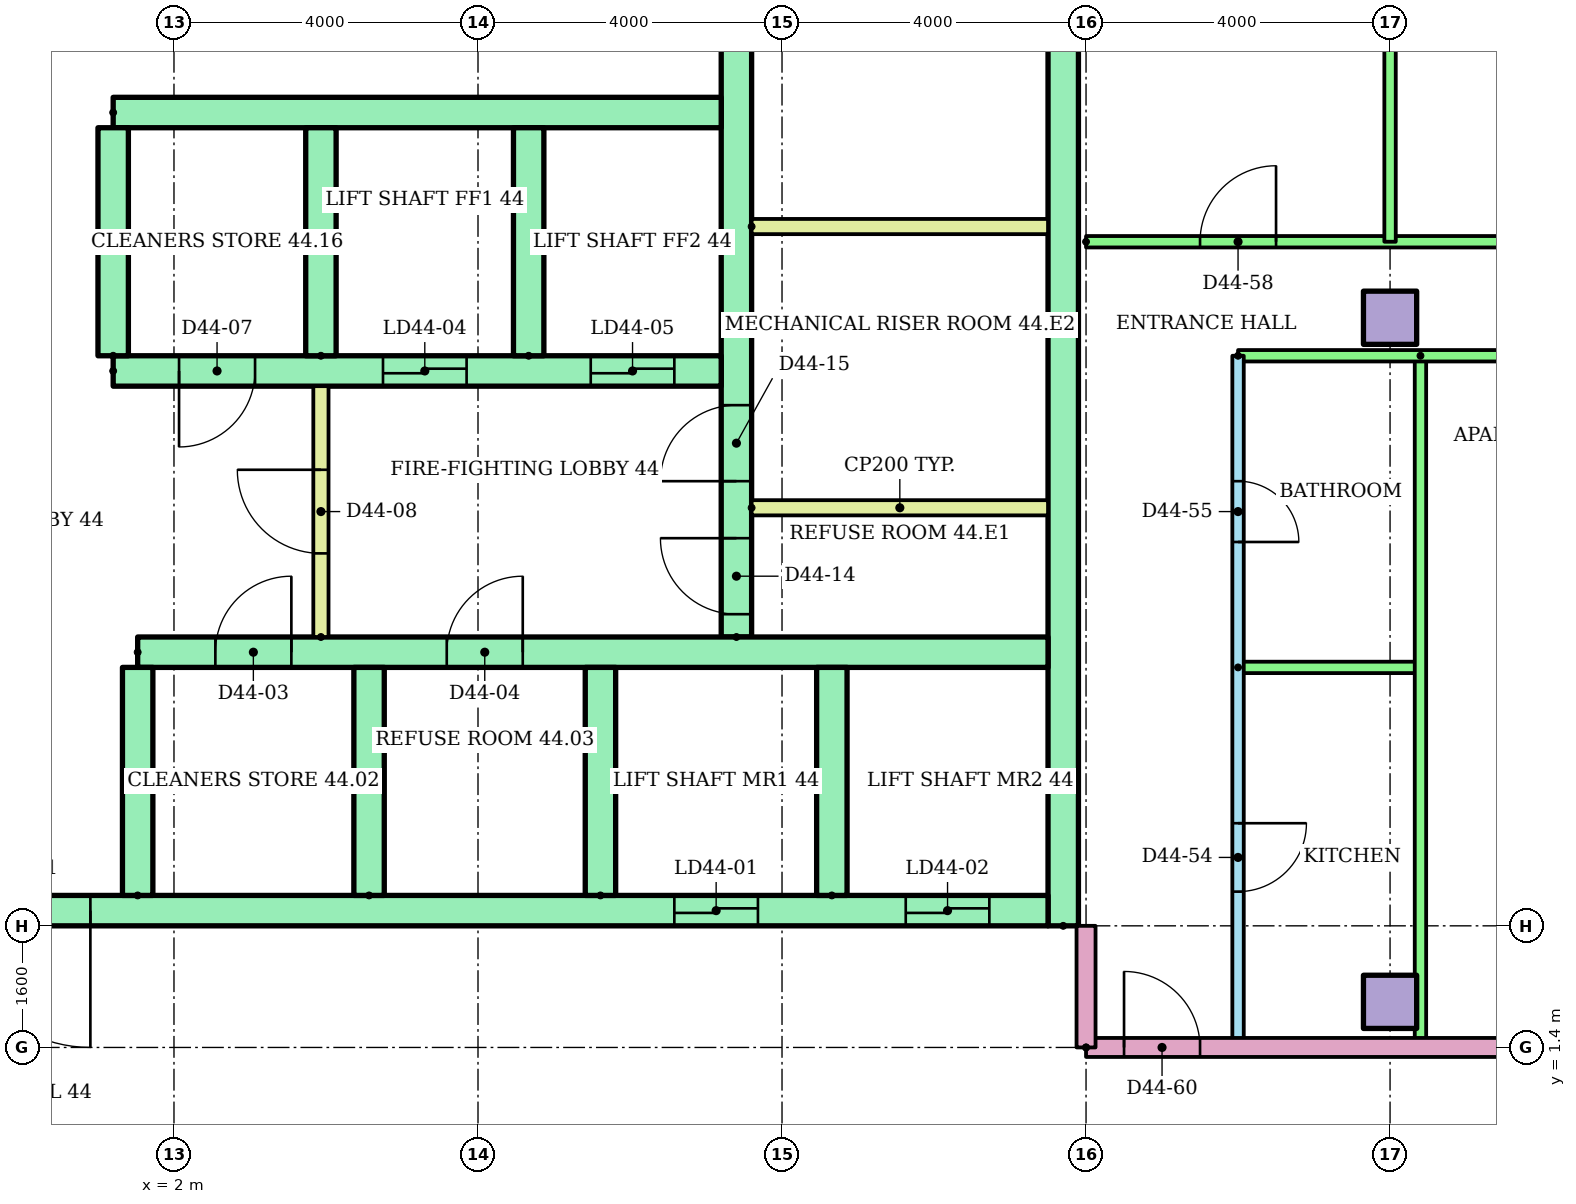
"""IFC4 building model, lengths in metres.
Left out: names, types, materials, properties, quantities, classifications, styles, units other than length and angle.
Written with IfcOpenShell. Run it as: python <this file> out.ifc"""

import sys

from ifc_helpers import new_model, si_unit, direction, frame, frame_2d, origin, origin_2d, place, context, subcontext, project, spatial, rectangle, extrude, element, fill, save


model = new_model("IFC4")
c1 = context("Model", 3, precision=1e-05, world=origin(), true_north=direction((0.0, 1.0)))
c2 = subcontext(c1, "Body", "Model", "MODEL_VIEW")
j1 = project(units=[si_unit("LENGTHUNIT", "METRE"), si_unit("PLANEANGLEUNIT", "RADIAN")], contexts=[c1])
p1 = place(None, origin())
s1 = spatial("IfcSite", under=j1, at=p1, CompositionType="ELEMENT")
p2 = place(p1, origin())
s2 = spatial("IfcBuilding", under=s1, at=p2, CompositionType="ELEMENT")
p3 = place(p2, frame((0.0, 0.0, 171.7)))
s3 = spatial("IfcBuildingStorey", under=s2, at=p3, CompositionType="ELEMENT", Elevation=171.7)
for number, where in (
    (1, (18.0, 2.0, 0.0)),
    (2, (18.0, 11.0, 0.0)),
):
    element("IfcColumn", number, at=place(p3, frame(where)), inside=s3, PredefinedType="COLUMN", context=c2, shape_type="SweptSolid", body=[
        extrude(rectangle(XDim=0.7, YDim=0.7, at=origin_2d()), origin(), (0.0, 0.0, 1.0), 3.2),
    ])
p4 = place(p3, frame((13.7, 3.0, 0.0), z_axis=(0.0, 0.0, 1.0), x_axis=(0.0, 1.0, 0.0)))
e3 = element("IfcWall", 3, at=p4, inside=s3, PredefinedType="SHEAR", context=c2, shape_type="SweptSolid", body=[
    extrude(rectangle(XDim=17.0, YDim=0.4, at=frame_2d((8.5, 0.0))), origin(), (0.0, 0.0, 1.0), 2.92),
])
p5 = place(p3, frame((9.4, 6.8, 0.0), z_axis=(0.0, 0.0, 1.0), x_axis=(0.0, 1.0, 0.0)))
e4 = element("IfcWall", 4, at=p5, inside=s3, PredefinedType="SHEAR", context=c2, shape_type="SweptSolid", body=[
    extrude(rectangle(XDim=12.7, YDim=0.4, at=frame_2d((6.35, 0.0))), origin(), (0.0, 0.0, 1.0), 2.92),
])
p6 = place(p5, frame((0.3, 0.0, 0.0)))
e5 = element("IfcOpeningElement", 5, at=p6, cuts=e4, PredefinedType="OPENING", context=c2, shape_type="SweptSolid", body=[
    extrude(rectangle(XDim=1.0, YDim=2.1, at=frame_2d((0.5, 1.05))), frame((0.0, 0.21, 0.0), z_axis=(0.0, -1.0, 0.0), x_axis=(1.0, 0.0, 0.0)), (0.0, 0.0, 1.0), 0.42),
])
p7 = place(p5, frame((2.05, 0.0, 0.0)))
e6 = element("IfcOpeningElement", 6, at=p7, cuts=e4, PredefinedType="OPENING", context=c2, shape_type="SweptSolid", body=[
    extrude(rectangle(XDim=1.0, YDim=2.1, at=frame_2d((0.5, 1.05))), frame((0.0, 0.21, 0.0), z_axis=(0.0, -1.0, 0.0), x_axis=(1.0, 0.0, 0.0)), (0.0, 0.0, 1.0), 0.42),
])
p8 = place(p5, frame((7.925, 0.0, 0.0)))
e7 = element("IfcOpeningElement", 7, at=p8, cuts=e4, PredefinedType="OPENING", context=c2, shape_type="SweptSolid", body=[
    extrude(rectangle(XDim=1.0, YDim=2.1, at=frame_2d((0.5, 1.05))), frame((0.0, 0.21, 0.0), z_axis=(0.0, -1.0, 0.0), x_axis=(1.0, 0.0, 0.0)), (0.0, 0.0, 1.0), 0.42),
])
p9 = place(p3, frame((-13.5, 3.2, 0.0)))
e8 = element("IfcWall", 8, at=p9, inside=s3, PredefinedType="SHEAR", context=c2, shape_type="SweptSolid", body=[
    extrude(rectangle(XDim=27.0, YDim=0.4, at=frame_2d((13.5, 0.0))), origin(), (0.0, 0.0, 1.0), 2.92),
])
p10 = place(p9, frame((22.083, 0.0, 0.0)))
e9 = element("IfcOpeningElement", 9, at=p10, cuts=e8, PredefinedType="OPENING", context=c2, shape_type="SweptSolid", body=[
    extrude(rectangle(XDim=1.1, YDim=2.1, at=frame_2d((0.55, 1.05))), frame((0.0, 0.21, 0.0), z_axis=(0.0, -1.0, 0.0), x_axis=(1.0, 0.0, 0.0)), (0.0, 0.0, 1.0), 0.42),
])
p11 = place(p9, frame((25.128, 0.0, 0.0)))
e10 = element("IfcOpeningElement", 10, at=p11, cuts=e8, PredefinedType="OPENING", context=c2, shape_type="SweptSolid", body=[
    extrude(rectangle(XDim=1.1, YDim=2.1, at=frame_2d((0.55, 1.05))), frame((0.0, 0.21, 0.0), z_axis=(0.0, -1.0, 0.0), x_axis=(1.0, 0.0, 0.0)), (0.0, 0.0, 1.0), 0.42),
])
p12 = place(p9, frame((12.6, 0.0, 0.0)))
e11 = element("IfcOpeningElement", 11, at=p12, cuts=e8, PredefinedType="OPENING", context=c2, shape_type="SweptSolid", body=[
    extrude(rectangle(XDim=1.8, YDim=2.1, at=frame_2d((0.9, 1.05))), frame((0.0, 0.21, 0.0), z_axis=(0.0, -1.0, 0.0), x_axis=(1.0, 0.0, 0.0)), (0.0, 0.0, 1.0), 0.42),
])
p13 = place(p3, frame((1.522, 6.6, 0.0)))
e12 = element("IfcWall", 12, at=p13, inside=s3, PredefinedType="SHEAR", context=c2, shape_type="SweptSolid", body=[
    extrude(rectangle(XDim=11.978, YDim=0.4, at=frame_2d((5.989, 0.0))), origin(), (0.0, 0.0, 1.0), 2.92),
])
p14 = place(p13, frame((1.022, 0.0, 0.0)))
e13 = element("IfcOpeningElement", 13, at=p14, cuts=e12, PredefinedType="OPENING", context=c2, shape_type="SweptSolid", body=[
    extrude(rectangle(XDim=1.0, YDim=2.1, at=frame_2d((0.5, 1.05))), frame((0.0, 0.21, 0.0), z_axis=(0.0, -1.0, 0.0), x_axis=(1.0, 0.0, 0.0)), (0.0, 0.0, 1.0), 0.42),
])
p15 = place(p13, frame((4.067, 0.0, 0.0)))
e14 = element("IfcOpeningElement", 14, at=p15, cuts=e12, PredefinedType="OPENING", context=c2, shape_type="SweptSolid", body=[
    extrude(rectangle(XDim=1.0, YDim=2.1, at=frame_2d((0.5, 1.05))), frame((0.0, 0.21, 0.0), z_axis=(0.0, -1.0, 0.0), x_axis=(1.0, 0.0, 0.0)), (0.0, 0.0, 1.0), 0.42),
])
for number, where, z_axis, x_axis in (
    (15, (1.522, 3.4, 0.0), (0.0, 0.0, 1.0), (0.0, 1.0, 0.0)),
    (16, (4.567, 3.4, 0.0), (0.0, 0.0, 1.0), (0.0, 1.0, 0.0)),
    (17, (7.611, 3.4, 0.0), (0.0, 0.0, 1.0), (0.0, 1.0, 0.0)),
    (18, (10.656, 3.4, 0.0), (0.0, 0.0, 1.0), (0.0, 1.0, 0.0)),
):
    element("IfcWall", number, at=place(p3, frame(where, z_axis=z_axis, x_axis=x_axis)), inside=s3, PredefinedType="SHEAR", context=c2, shape_type="SweptSolid", body=[
        extrude(rectangle(XDim=3.0, YDim=0.4, at=frame_2d((1.5, 0.0))), origin(), (0.0, 0.0, 1.0), 2.92),
    ])
p16 = place(p3, frame((1.2, 10.3, 0.0)))
e19 = element("IfcWall", 19, at=p16, inside=s3, PredefinedType="SHEAR", context=c2, shape_type="SweptSolid", body=[
    extrude(rectangle(XDim=8.0, YDim=0.4, at=frame_2d((4.0, 0.0))), origin(), (0.0, 0.0, 1.0), 2.92),
])
p17 = place(p16, frame((3.55, 0.0, 0.0)))
e20 = element("IfcOpeningElement", 20, at=p17, cuts=e19, PredefinedType="OPENING", context=c2, shape_type="SweptSolid", body=[
    extrude(rectangle(XDim=1.1, YDim=2.1, at=frame_2d((0.55, 1.05))), frame((0.0, 0.21, 0.0), z_axis=(0.0, -1.0, 0.0), x_axis=(1.0, 0.0, 0.0)), (0.0, 0.0, 1.0), 0.42),
])
p18 = place(p16, frame((6.283, 0.0, 0.0)))
e21 = element("IfcOpeningElement", 21, at=p18, cuts=e19, PredefinedType="OPENING", context=c2, shape_type="SweptSolid", body=[
    extrude(rectangle(XDim=1.1, YDim=2.1, at=frame_2d((0.55, 1.05))), frame((0.0, 0.21, 0.0), z_axis=(0.0, -1.0, 0.0), x_axis=(1.0, 0.0, 0.0)), (0.0, 0.0, 1.0), 0.42),
])
p19 = place(p16, frame((0.867, 0.0, 0.0)))
e22 = element("IfcOpeningElement", 22, at=p19, cuts=e19, PredefinedType="OPENING", context=c2, shape_type="SweptSolid", body=[
    extrude(rectangle(XDim=1.0, YDim=2.1, at=frame_2d((0.5, 1.05))), frame((0.0, 0.21, 0.0), z_axis=(0.0, -1.0, 0.0), x_axis=(1.0, 0.0, 0.0)), (0.0, 0.0, 1.0), 0.42),
])
p20 = place(p3, frame((1.2, 13.7, 0.0)))
e23 = element("IfcWall", 23, at=p20, inside=s3, PredefinedType="SHEAR", context=c2, shape_type="SweptSolid", body=[
    extrude(rectangle(XDim=8.0, YDim=0.4, at=frame_2d((4.0, 0.0))), origin(), (0.0, 0.0, 1.0), 2.92),
])
for number, where, z_axis, x_axis in (
    (24, (1.2, 10.5, 0.0), (0.0, 0.0, 1.0), (0.0, 1.0, 0.0)),
    (25, (3.933, 10.5, 0.0), (0.0, 0.0, 1.0), (0.0, 1.0, 0.0)),
    (26, (6.667, 10.5, 0.0), (0.0, 0.0, 1.0), (0.0, 1.0, 0.0)),
):
    element("IfcWall", number, at=place(p3, frame(where, z_axis=z_axis, x_axis=x_axis)), inside=s3, PredefinedType="SHEAR", context=c2, shape_type="SweptSolid", body=[
        extrude(rectangle(XDim=3.0, YDim=0.4, at=frame_2d((1.5, 0.0))), origin(), (0.0, 0.0, 1.0), 2.92),
    ])
p21 = place(p3, frame((3.933, 6.8, 0.0), z_axis=(0.0, 0.0, 1.0), x_axis=(0.0, 1.0, 0.0)))
e27 = element("IfcWall", 27, at=p21, inside=s3, PredefinedType="PARTITIONING", context=c2, shape_type="SweptSolid", body=[
    extrude(rectangle(XDim=3.3, YDim=0.2, at=frame_2d((1.65, 0.0))), origin(), (0.0, 0.0, 1.0), 2.92),
])
p22 = place(p21, frame((1.1, 0.0, 0.0)))
e28 = element("IfcOpeningElement", 28, at=p22, cuts=e27, PredefinedType="OPENING", context=c2, shape_type="SweptSolid", body=[
    extrude(rectangle(XDim=1.1, YDim=2.1, at=frame_2d((0.55, 1.05))), frame((0.0, 0.11, 0.0), z_axis=(0.0, -1.0, 0.0), x_axis=(1.0, 0.0, 0.0)), (0.0, 0.0, 1.0), 0.22),
])
for number, where in (
    (29, (9.6, 8.5, 0.0)),
    (30, (9.6, 12.2, 0.0)),
):
    element("IfcWall", number, at=place(p3, frame(where)), inside=s3, PredefinedType="PARTITIONING", context=c2, shape_type="SweptSolid", body=[
        extrude(rectangle(XDim=3.9, YDim=0.2, at=frame_2d((1.95, 0.0))), origin(), (0.0, 0.0, 1.0), 2.92),
    ])
p23 = place(p3, frame((16.0, 10.5, 0.0), z_axis=(0.0, 0.0, 1.0), x_axis=(0.0, -1.0, 0.0)))
e31 = element("IfcWall", 31, at=p23, inside=s3, PredefinedType="PARTITIONING", context=c2, shape_type="SweptSolid", body=[
    extrude(rectangle(XDim=9.1, YDim=0.15, at=frame_2d((4.55, 0.0))), origin(), (0.0, 0.0, 1.0), 2.4),
])
p24 = place(p23, frame((6.15, 0.0, 0.0)))
e32 = element("IfcOpeningElement", 32, at=p24, cuts=e31, PredefinedType="OPENING", context=c2, shape_type="SweptSolid", body=[
    extrude(rectangle(XDim=0.9, YDim=2.1, at=frame_2d((0.45, 1.05))), frame((0.0, 0.085, 0.0), z_axis=(0.0, -1.0, 0.0), x_axis=(1.0, 0.0, 0.0)), (0.0, 0.0, 1.0), 0.17),
])
p25 = place(p23, frame((1.65, 0.0, 0.0)))
e33 = element("IfcOpeningElement", 33, at=p25, cuts=e31, PredefinedType="OPENING", context=c2, shape_type="SweptSolid", body=[
    extrude(rectangle(XDim=0.8, YDim=2.1, at=frame_2d((0.4, 1.05))), frame((0.0, 0.085, 0.0), z_axis=(0.0, -1.0, 0.0), x_axis=(1.0, 0.0, 0.0)), (0.0, 0.0, 1.0), 0.17),
])
p26 = place(p3, frame((16.0, 6.4, 0.0)))
e34 = element("IfcWall", 34, at=p26, inside=s3, PredefinedType="PARTITIONING", context=c2, shape_type="SweptSolid", body=[
    extrude(rectangle(XDim=2.4, YDim=0.15, at=frame_2d((1.2, 0.0))), origin(), (0.0, 0.0, 1.0), 2.4),
])
p27 = place(p3, frame((18.4, 10.5, 0.0), z_axis=(0.0, 0.0, 1.0), x_axis=(0.0, -1.0, 0.0)))
e35 = element("IfcWall", 35, at=p27, inside=s3, PredefinedType="PARTITIONING", context=c2, shape_type="SweptSolid", body=[
    extrude(rectangle(XDim=9.1, YDim=0.15, at=frame_2d((4.55, 0.0))), origin(), (0.0, 0.0, 1.0), 2.4),
])
p28 = place(p3, frame((26.0, 10.5, 0.0), z_axis=(0.0, 0.0, 1.0), x_axis=(-1.0, 0.0, 0.0)))
e36 = element("IfcWall", 36, at=p28, inside=s3, PredefinedType="PARTITIONING", context=c2, shape_type="SweptSolid", body=[
    extrude(rectangle(XDim=10.0, YDim=0.15, at=frame_2d((5.0, 0.0))), origin(), (0.0, 0.0, 1.0), 2.4),
])
p29 = place(p28, frame((4.9, 0.0, 0.0)))
e37 = element("IfcOpeningElement", 37, at=p29, cuts=e36, PredefinedType="OPENING", context=c2, shape_type="SweptSolid", body=[
    extrude(rectangle(XDim=0.9, YDim=2.1, at=frame_2d((0.45, 1.05))), frame((0.0, 0.085, 0.0), z_axis=(0.0, -1.0, 0.0), x_axis=(1.0, 0.0, 0.0)), (0.0, 0.0, 1.0), 0.17),
])
p30 = place(p28, frame((1.1, 0.0, 0.0)))
e38 = element("IfcOpeningElement", 38, at=p30, cuts=e36, PredefinedType="OPENING", context=c2, shape_type="SweptSolid", body=[
    extrude(rectangle(XDim=0.9, YDim=2.1, at=frame_2d((0.45, 1.05))), frame((0.0, 0.085, 0.0), z_axis=(0.0, -1.0, 0.0), x_axis=(1.0, 0.0, 0.0)), (0.0, 0.0, 1.0), 0.17),
])
p31 = place(p3, frame((14.0, 12.0, 0.0)))
e39 = element("IfcWall", 39, at=p31, inside=s3, PredefinedType="PARTITIONING", context=c2, shape_type="SweptSolid", body=[
    extrude(rectangle(XDim=12.0, YDim=0.15, at=frame_2d((6.0, 0.0))), origin(), (0.0, 0.0, 1.0), 2.4),
])
p32 = place(p31, frame((1.5, 0.0, 0.0)))
e40 = element("IfcOpeningElement", 40, at=p32, cuts=e39, PredefinedType="OPENING", context=c2, shape_type="SweptSolid", body=[
    extrude(rectangle(XDim=1.0, YDim=2.1, at=frame_2d((0.5, 1.05))), frame((0.0, 0.085, 0.0), z_axis=(0.0, -1.0, 0.0), x_axis=(1.0, 0.0, 0.0)), (0.0, 0.0, 1.0), 0.17),
])
p33 = place(p31, frame((7.55, 0.0, 0.0)))
e41 = element("IfcOpeningElement", 41, at=p33, cuts=e39, PredefinedType="OPENING", context=c2, shape_type="SweptSolid", body=[
    extrude(rectangle(XDim=0.9, YDim=2.1, at=frame_2d((0.45, 1.05))), frame((0.0, 0.085, 0.0), z_axis=(0.0, -1.0, 0.0), x_axis=(1.0, 0.0, 0.0)), (0.0, 0.0, 1.0), 0.17),
])
p34 = place(p3, frame((18.0, 18.821, 0.0), z_axis=(0.0, 0.0, 1.0), x_axis=(0.0, -1.0, 0.0)))
e42 = element("IfcWall", 42, at=p34, inside=s3, PredefinedType="PARTITIONING", context=c2, shape_type="SweptSolid", body=[
    extrude(rectangle(XDim=6.821, YDim=0.15, at=frame_2d((3.411, 0.0))), origin(), (0.0, 0.0, 1.0), 2.4),
])
p35 = place(p3, frame((14.0, 1.4, 0.0)))
e43 = element("IfcWall", 43, at=p35, inside=s3, PredefinedType="PARTITIONING", context=c2, shape_type="SweptSolid", body=[
    extrude(rectangle(XDim=15.0, YDim=0.25, at=frame_2d((7.5, 0.0))), origin(), (0.0, 0.0, 1.0), 2.4),
])
p36 = place(p35, frame((0.5, 0.0, 0.0)))
e44 = element("IfcOpeningElement", 44, at=p36, cuts=e43, PredefinedType="OPENING", context=c2, shape_type="SweptSolid", body=[
    extrude(rectangle(XDim=1.0, YDim=2.1, at=frame_2d((0.5, 1.05))), frame((0.0, 0.135, 0.0), z_axis=(0.0, -1.0, 0.0), x_axis=(1.0, 0.0, 0.0)), (0.0, 0.0, 1.0), 0.27),
])
p37 = place(p35, frame((12.547, 0.0, 0.0)))
e45 = element("IfcOpeningElement", 45, at=p37, cuts=e43, PredefinedType="OPENING", context=c2, shape_type="SweptSolid", body=[
    extrude(rectangle(XDim=1.0, YDim=2.1, at=frame_2d((0.5, 1.05))), frame((0.0, 0.135, 0.0), z_axis=(0.0, -1.0, 0.0), x_axis=(1.0, 0.0, 0.0)), (0.0, 0.0, 1.0), 0.27),
])
p38 = place(p3, frame((14.0, 1.4, 0.0), z_axis=(0.0, 0.0, 1.0), x_axis=(0.0, 1.0, 0.0)))
e46 = element("IfcWall", 46, at=p38, inside=s3, PredefinedType="PARTITIONING", context=c2, shape_type="SweptSolid", body=[
    extrude(rectangle(XDim=1.6, YDim=0.25, at=frame_2d((0.8, 0.0))), origin(), (0.0, 0.0, 1.0), 2.4),
])
p39 = place(p10, origin())
e47 = element("IfcDoor", 47, at=p39, inside=s3, OperationType="SLIDING_TO_LEFT", PredefinedType="DOOR", context=c2, shape_type="SweptSolid", body=[
    extrude(rectangle(XDim=1.1, YDim=2.1, at=frame_2d((0.55, 1.05))), frame((0.0, 0.025, 0.0), z_axis=(0.0, -1.0, 0.0), x_axis=(1.0, 0.0, 0.0)), (0.0, 0.0, 1.0), 0.05),
])
fill(e9, e47)
p40 = place(p11, origin())
e48 = element("IfcDoor", 48, at=p40, inside=s3, OperationType="SLIDING_TO_LEFT", PredefinedType="DOOR", context=c2, shape_type="SweptSolid", body=[
    extrude(rectangle(XDim=1.1, YDim=2.1, at=frame_2d((0.55, 1.05))), frame((0.0, 0.025, 0.0), z_axis=(0.0, -1.0, 0.0), x_axis=(1.0, 0.0, 0.0)), (0.0, 0.0, 1.0), 0.05),
])
fill(e10, e48)
p41 = place(p12, frame((1.8, 0.0, 0.0), z_axis=(0.0, 0.0, 1.0), x_axis=(-1.0, 0.0, 0.0)))
e49 = element("IfcDoor", 49, at=p41, inside=s3, OperationType="DOUBLE_DOOR_SINGLE_SWING", PredefinedType="DOOR", context=c2, shape_type="SweptSolid", body=[
    extrude(rectangle(XDim=1.8, YDim=2.1, at=frame_2d((0.9, 1.05))), frame((0.0, 0.025, 0.0), z_axis=(0.0, -1.0, 0.0), x_axis=(1.0, 0.0, 0.0)), (0.0, 0.0, 1.0), 0.05),
])
fill(e11, e49)
p42 = place(p14, origin())
e50 = element("IfcDoor", 50, at=p42, inside=s3, OperationType="SINGLE_SWING_RIGHT", PredefinedType="DOOR", context=c2, shape_type="SweptSolid", body=[
    extrude(rectangle(XDim=1.0, YDim=2.1, at=frame_2d((0.5, 1.05))), frame((0.0, 0.025, 0.0), z_axis=(0.0, -1.0, 0.0), x_axis=(1.0, 0.0, 0.0)), (0.0, 0.0, 1.0), 0.05),
])
fill(e13, e50)
p43 = place(p15, origin())
e51 = element("IfcDoor", 51, at=p43, inside=s3, OperationType="SINGLE_SWING_RIGHT", PredefinedType="DOOR", context=c2, shape_type="SweptSolid", body=[
    extrude(rectangle(XDim=1.0, YDim=2.1, at=frame_2d((0.5, 1.05))), frame((0.0, 0.025, 0.0), z_axis=(0.0, -1.0, 0.0), x_axis=(1.0, 0.0, 0.0)), (0.0, 0.0, 1.0), 0.05),
])
fill(e14, e51)
p44 = place(p17, origin())
e52 = element("IfcDoor", 52, at=p44, inside=s3, OperationType="SLIDING_TO_LEFT", PredefinedType="DOOR", context=c2, shape_type="SweptSolid", body=[
    extrude(rectangle(XDim=1.1, YDim=2.1, at=frame_2d((0.55, 1.05))), frame((0.0, 0.025, 0.0), z_axis=(0.0, -1.0, 0.0), x_axis=(1.0, 0.0, 0.0)), (0.0, 0.0, 1.0), 0.05),
])
fill(e20, e52)
p45 = place(p18, origin())
e53 = element("IfcDoor", 53, at=p45, inside=s3, OperationType="SLIDING_TO_LEFT", PredefinedType="DOOR", context=c2, shape_type="SweptSolid", body=[
    extrude(rectangle(XDim=1.1, YDim=2.1, at=frame_2d((0.55, 1.05))), frame((0.0, 0.025, 0.0), z_axis=(0.0, -1.0, 0.0), x_axis=(1.0, 0.0, 0.0)), (0.0, 0.0, 1.0), 0.05),
])
fill(e21, e53)
p46 = place(p19, frame((1.0, 0.0, 0.0), z_axis=(0.0, 0.0, 1.0), x_axis=(-1.0, 0.0, 0.0)))
e54 = element("IfcDoor", 54, at=p46, inside=s3, OperationType="SINGLE_SWING_LEFT", PredefinedType="DOOR", context=c2, shape_type="SweptSolid", body=[
    extrude(rectangle(XDim=1.0, YDim=2.1, at=frame_2d((0.5, 1.05))), frame((0.0, 0.025, 0.0), z_axis=(0.0, -1.0, 0.0), x_axis=(1.0, 0.0, 0.0)), (0.0, 0.0, 1.0), 0.05),
])
fill(e22, e54)
p47 = place(p22, origin())
e55 = element("IfcDoor", 55, at=p47, inside=s3, OperationType="SINGLE_SWING_RIGHT", PredefinedType="DOOR", context=c2, shape_type="SweptSolid", body=[
    extrude(rectangle(XDim=1.1, YDim=2.1, at=frame_2d((0.55, 1.05))), frame((0.0, 0.025, 0.0), z_axis=(0.0, -1.0, 0.0), x_axis=(1.0, 0.0, 0.0)), (0.0, 0.0, 1.0), 0.05),
])
fill(e28, e55)
p48 = place(p6, origin())
e56 = element("IfcDoor", 56, at=p48, inside=s3, OperationType="SINGLE_SWING_RIGHT", PredefinedType="DOOR", context=c2, shape_type="SweptSolid", body=[
    extrude(rectangle(XDim=1.0, YDim=2.1, at=frame_2d((0.5, 1.05))), frame((0.0, 0.025, 0.0), z_axis=(0.0, -1.0, 0.0), x_axis=(1.0, 0.0, 0.0)), (0.0, 0.0, 1.0), 0.05),
])
fill(e5, e56)
p49 = place(p7, origin())
e57 = element("IfcDoor", 57, at=p49, inside=s3, OperationType="SINGLE_SWING_LEFT", PredefinedType="DOOR", context=c2, shape_type="SweptSolid", body=[
    extrude(rectangle(XDim=1.0, YDim=2.1, at=frame_2d((0.5, 1.05))), frame((0.0, 0.025, 0.0), z_axis=(0.0, -1.0, 0.0), x_axis=(1.0, 0.0, 0.0)), (0.0, 0.0, 1.0), 0.05),
])
fill(e6, e57)
p50 = place(p24, origin())
e58 = element("IfcDoor", 58, at=p50, inside=s3, OperationType="SINGLE_SWING_LEFT", PredefinedType="DOOR", context=c2, shape_type="SweptSolid", body=[
    extrude(rectangle(XDim=0.9, YDim=2.1, at=frame_2d((0.45, 1.05))), frame((0.0, 0.025, 0.0), z_axis=(0.0, -1.0, 0.0), x_axis=(1.0, 0.0, 0.0)), (0.0, 0.0, 1.0), 0.05),
])
fill(e32, e58)
p51 = place(p25, origin())
e59 = element("IfcDoor", 59, at=p51, inside=s3, OperationType="SINGLE_SWING_RIGHT", PredefinedType="DOOR", context=c2, shape_type="SweptSolid", body=[
    extrude(rectangle(XDim=0.8, YDim=2.1, at=frame_2d((0.4, 1.05))), frame((0.0, 0.025, 0.0), z_axis=(0.0, -1.0, 0.0), x_axis=(1.0, 0.0, 0.0)), (0.0, 0.0, 1.0), 0.05),
])
fill(e33, e59)
p52 = place(p32, origin())
e60 = element("IfcDoor", 60, at=p52, inside=s3, OperationType="SINGLE_SWING_RIGHT", PredefinedType="DOOR", context=c2, shape_type="SweptSolid", body=[
    extrude(rectangle(XDim=1.0, YDim=2.1, at=frame_2d((0.5, 1.05))), frame((0.0, 0.025, 0.0), z_axis=(0.0, -1.0, 0.0), x_axis=(1.0, 0.0, 0.0)), (0.0, 0.0, 1.0), 0.05),
])
fill(e40, e60)
p53 = place(p36, origin())
e61 = element("IfcDoor", 61, at=p53, inside=s3, OperationType="SINGLE_SWING_LEFT", PredefinedType="DOOR", context=c2, shape_type="SweptSolid", body=[
    extrude(rectangle(XDim=1.0, YDim=2.1, at=frame_2d((0.5, 1.05))), frame((0.0, 0.025, 0.0), z_axis=(0.0, -1.0, 0.0), x_axis=(1.0, 0.0, 0.0)), (0.0, 0.0, 1.0), 0.05),
])
fill(e44, e61)
save(model, sys.argv[1])
